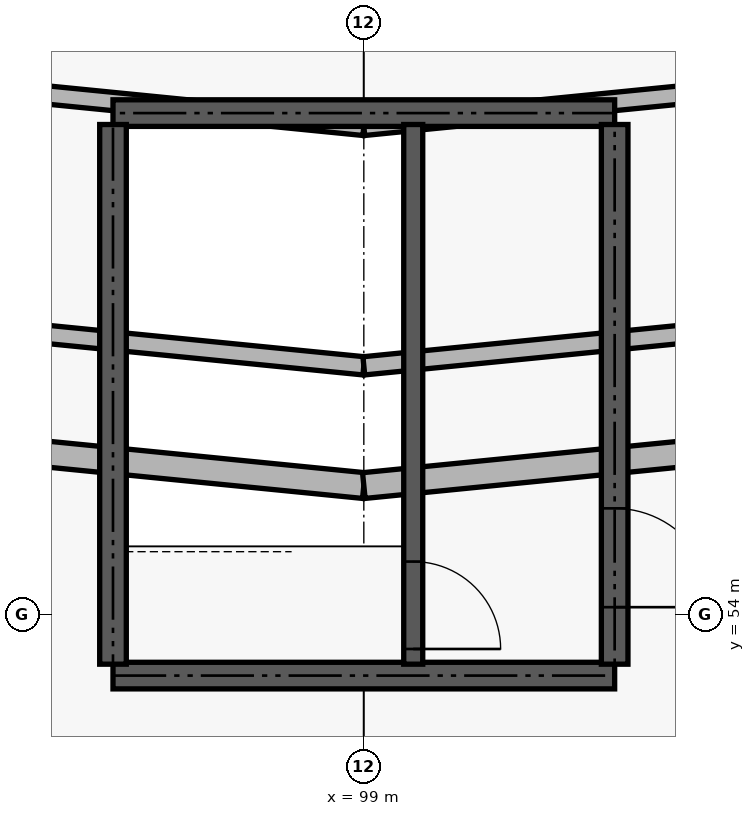
"""IFC4 building model, lengths in metres.
Left out: names, types, materials, properties, quantities, classifications, styles, units other than length and angle.
Written with IfcOpenShell. Run it as: python <this file> out.ifc"""

import sys

from ifc_helpers import new_model, si_unit, direction, frame, frame_2d, origin, place, context, subcontext, project, spatial, rectangle, extrude, element, fill, save


model = new_model("IFC4")
c1 = context("Model", 3, precision=1e-05, world=origin(), true_north=direction((0.0, 1.0)))
c2 = subcontext(c1, "Body", "Model", "MODEL_VIEW")
j1 = project(units=[si_unit("LENGTHUNIT", "METRE"), si_unit("PLANEANGLEUNIT", "RADIAN")], contexts=[c1])
p1 = place(None, origin())
s1 = spatial("IfcSite", under=j1, at=p1, CompositionType="ELEMENT")
p2 = place(p1, origin())
s2 = spatial("IfcBuilding", under=s1, at=p2, CompositionType="ELEMENT")
p3 = place(p2, frame((0.0, 0.0, 9.6)))
s3 = spatial("IfcBuildingStorey", under=s2, at=p3, CompositionType="ELEMENT", Elevation=9.6)
p4 = place(p3, frame((87.405, 56.852, 4.53), z_axis=(0.0, 0.0, 1.0), x_axis=(0.995099849345, -0.098875122419, 0.0)))
e1 = element("IfcWall", 1, at=p4, inside=s3, PredefinedType="SOLIDWALL", context=c2, shape_type="SweptSolid", body=[
    extrude(rectangle(XDim=11.652, YDim=0.34, at=frame_2d((5.826, 0.0))), origin(), (0.0, 0.0, 1.0), 3.02),
])
p5 = place(p3, frame((87.942, 58.373, 7.58), z_axis=(0.0, 0.0, 1.0), x_axis=(0.995105258288, -0.098820670548, 0.0)))
e2 = element("IfcWall", 2, at=p5, inside=s3, PredefinedType="SOLIDWALL", context=c2, shape_type="SweptSolid", body=[
    extrude(rectangle(XDim=11.113, YDim=0.24, at=frame_2d((5.556, 0.0))), origin(), (0.0, 0.0, 1.0), 2.37),
])
p6 = place(p3, frame((89.016, 61.416, 7.58), z_axis=(0.0, 0.0, 1.0), x_axis=(0.995110163253, -0.098771266021, 0.0)))
e3 = element("IfcWall", 3, at=p6, inside=s3, PredefinedType="SOLIDWALL", context=c2, shape_type="SweptSolid", body=[
    extrude(rectangle(XDim=10.033, YDim=0.24, at=frame_2d((5.017, 0.0))), origin(), (0.0, 0.0, 1.0), 2.37),
])
p7 = place(p3, frame((99.0, 55.7, 4.53), z_axis=(0.0, 0.0, 1.0), x_axis=(0.995099849345, 0.098875122419, 0.0)))
e4 = element("IfcWall", 4, at=p7, inside=s3, PredefinedType="SOLIDWALL", context=c2, shape_type="SweptSolid", body=[
    extrude(rectangle(XDim=11.652, YDim=0.34, at=frame_2d((5.826, 0.0))), origin(), (0.0, 0.0, 1.0), 3.02),
])
p8 = place(p3, frame((99.0, 57.275, 7.58), z_axis=(0.0, 0.0, 1.0), x_axis=(0.995105258288, 0.098820670548, 0.0)))
e5 = element("IfcWall", 5, at=p8, inside=s3, PredefinedType="SOLIDWALL", context=c2, shape_type="SweptSolid", body=[
    extrude(rectangle(XDim=11.113, YDim=0.24, at=frame_2d((5.556, 0.0))), origin(), (0.0, 0.0, 1.0), 2.37),
])
p9 = place(p3, frame((99.0, 60.425, 7.58), z_axis=(0.0, 0.0, 1.0), x_axis=(0.995110163253, 0.098771266021, 0.0)))
e6 = element("IfcWall", 6, at=p9, inside=s3, PredefinedType="SOLIDWALL", context=c2, shape_type="SweptSolid", body=[
    extrude(rectangle(XDim=10.033, YDim=0.24, at=frame_2d((5.017, 0.0))), origin(), (0.0, 0.0, 1.0), 2.37),
])
for number, where, z_axis, x_axis in (
    (7, (95.7, 53.2, 0.0), (0.0, 0.0, 1.0), (1.0, 0.0, 0.0)),
    (8, (95.7, 60.6, 0.0), (0.0, 0.0, 1.0), (1.0, 0.0, 0.0)),
):
    element("IfcWall", number, at=place(p3, frame(where, z_axis=z_axis, x_axis=x_axis)), inside=s3, PredefinedType="SHEAR", context=c2, shape_type="SweptSolid", body=[
        extrude(rectangle(XDim=6.6, YDim=0.35, at=frame_2d((3.3, 0.0))), origin(), (0.0, 0.0, 1.0), 3.4),
    ])
p10 = place(p3, frame((95.7, 53.35, 0.0), z_axis=(0.0, 0.0, 1.0), x_axis=(0.0, 1.0, 0.0)))
e9 = element("IfcWall", 9, at=p10, inside=s3, PredefinedType="SHEAR", context=c2, shape_type="SweptSolid", body=[
    extrude(rectangle(XDim=7.1, YDim=0.35, at=frame_2d((3.55, 0.0))), origin(), (0.0, 0.0, 1.0), 3.4),
])
p11 = place(p3, frame((102.3, 53.35, 0.0), z_axis=(0.0, 0.0, 1.0), x_axis=(0.0, 1.0, 0.0)))
e10 = element("IfcWall", 10, at=p11, inside=s3, PredefinedType="SHEAR", context=c2, shape_type="SweptSolid", body=[
    extrude(rectangle(XDim=7.1, YDim=0.35, at=frame_2d((3.55, 0.0))), origin(), (0.0, 0.0, 1.0), 3.4),
])
p12 = place(p11, frame((0.75, 0.0, 0.0)))
e11 = element("IfcOpeningElement", 11, at=p12, cuts=e10, PredefinedType="OPENING", context=c2, shape_type="SweptSolid", body=[
    extrude(rectangle(XDim=1.3, YDim=2.15, at=frame_2d((0.65, 1.075))), frame((0.0, 0.185, 0.0), z_axis=(0.0, -1.0, 0.0), x_axis=(1.0, 0.0, 0.0)), (0.0, 0.0, 1.0), 0.37),
])
p13 = place(p3, frame((99.65, 53.35, 0.0), z_axis=(0.0, 0.0, 1.0), x_axis=(0.0, 1.0, 0.0)))
e12 = element("IfcWall", 12, at=p13, inside=s3, PredefinedType="SHEAR", context=c2, shape_type="SweptSolid", body=[
    extrude(rectangle(XDim=7.1, YDim=0.25, at=frame_2d((3.55, 0.0))), origin(), (0.0, 0.0, 1.0), 3.4),
])
p14 = place(p13, frame((0.2, 0.0, 0.0)))
e13 = element("IfcOpeningElement", 13, at=p14, cuts=e12, PredefinedType="OPENING", context=c2, shape_type="SweptSolid", body=[
    extrude(rectangle(XDim=1.15, YDim=2.15, at=frame_2d((0.575, 1.075))), frame((0.0, 0.135, 0.0), z_axis=(0.0, -1.0, 0.0), x_axis=(1.0, 0.0, 0.0)), (0.0, 0.0, 1.0), 0.27),
])
p15 = place(p12, frame((1.3, 0.0, 0.0), z_axis=(0.0, 0.0, 1.0), x_axis=(-1.0, 0.0, 0.0)))
e14 = element("IfcDoor", 14, at=p15, inside=s3, OperationType="DOUBLE_DOOR_SINGLE_SWING", PredefinedType="DOOR", context=c2, shape_type="SweptSolid", body=[
    extrude(rectangle(XDim=1.3, YDim=2.15, at=frame_2d((0.65, 1.075))), frame((0.0, 0.025, 0.0), z_axis=(0.0, -1.0, 0.0), x_axis=(1.0, 0.0, 0.0)), (0.0, 0.0, 1.0), 0.05),
])
fill(e11, e14)
p16 = place(p14, frame((1.15, 0.0, 0.0), z_axis=(0.0, 0.0, 1.0), x_axis=(-1.0, 0.0, 0.0)))
e15 = element("IfcDoor", 15, at=p16, inside=s3, OperationType="SINGLE_SWING_LEFT", PredefinedType="DOOR", context=c2, shape_type="SweptSolid", body=[
    extrude(rectangle(XDim=1.15, YDim=2.15, at=frame_2d((0.575, 1.075))), frame((0.0, 0.025, 0.0), z_axis=(0.0, -1.0, 0.0), x_axis=(1.0, 0.0, 0.0)), (0.0, 0.0, 1.0), 0.05),
])
fill(e13, e15)
save(model, sys.argv[1])
